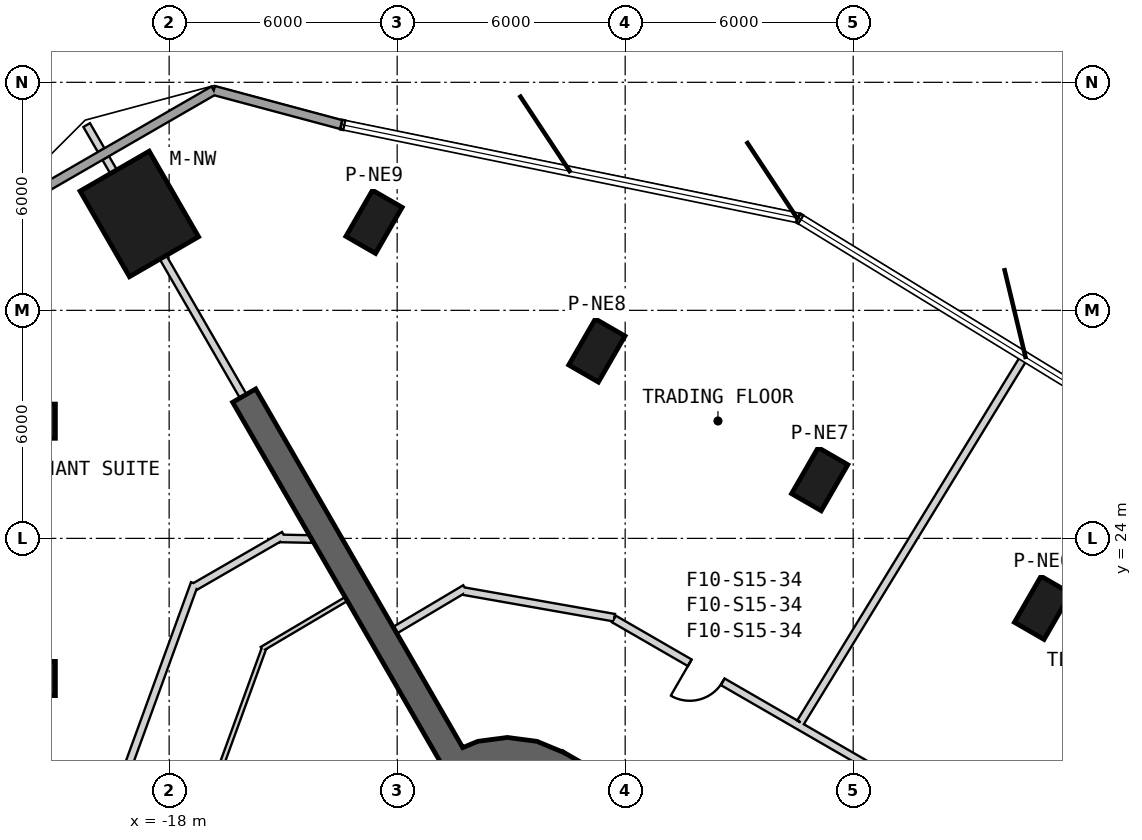
"""IFC4 building model, lengths in metres.
Left out: names, types, materials, properties, quantities, classifications, styles, units other than length and angle.
Written with IfcOpenShell. Run it as: python <this file> out.ifc"""

import sys

from ifc_helpers import new_model, si_unit, direction, frame, frame_2d, origin, origin_2d, place, context, subcontext, project, spatial, polyline, rectangle, outline, extrude, element, fill, save


model = new_model("IFC4")
c1 = context("Model", 3, precision=1e-05, world=origin(), true_north=direction((0.0, 1.0)))
c2 = subcontext(c1, "Body", "Model", "MODEL_VIEW")
j1 = project(units=[si_unit("LENGTHUNIT", "METRE"), si_unit("PLANEANGLEUNIT", "RADIAN")], contexts=[c1])
p1 = place(None, origin())
s1 = spatial("IfcSite", under=j1, at=p1, CompositionType="ELEMENT")
p2 = place(p1, origin())
s2 = spatial("IfcBuilding", under=s1, at=p2, CompositionType="ELEMENT")
p3 = place(p2, frame((0.0, 0.0, 241.2)))
s3 = spatial("IfcBuildingStorey", under=s2, at=p3, CompositionType="ELEMENT", Elevation=241.2)
p4 = place(p3, frame((-18.785, 32.536, 0.0), z_axis=(0.0, 0.0, 1.0), x_axis=(-0.5, 0.866025403784, 0.0)))
e1 = element("IfcColumn", 1, at=p4, inside=s3, PredefinedType="COLUMN", context=c2, shape_type="SweptSolid", body=[
    extrude(rectangle(XDim=2.6, YDim=2.1, at=origin_2d()), origin(), (0.0, 0.0, 1.0), 4.0),
])
for number, where, z_axis, x_axis in (
    (2, (-21.693, 27.084, 0.0), (0.0, 0.0, 1.0), (-1.0, 0.0, 0.0)),
    (3, (-21.693, 20.313, 0.0), (0.0, 0.0, 1.0), (-1.0, 0.0, 0.0)),
    (4, (4.983, 22.172, 0.0), (0.0, 0.0, 1.0), (0.5, 0.866, 0.0)),
    (5, (-0.881, 25.558, 0.0), (0.0, 0.0, 1.0), (0.5, 0.866, 0.0)),
    (6, (-6.745, 28.943, 0.0), (0.0, 0.0, 1.0), (0.5, 0.866, 0.0)),
    (7, (-12.609, 32.329, 0.0), (0.0, 0.0, 1.0), (0.5, 0.866, 0.0)),
):
    element("IfcColumn", number, at=place(p3, frame(where, z_axis=z_axis, x_axis=x_axis)), inside=s3, PredefinedType="COLUMN", context=c2, shape_type="SweptSolid", body=[
        extrude(rectangle(XDim=1.4, YDim=0.9, at=origin_2d()), origin(), (0.0, 0.0, 1.0), 4.0),
    ])
p5 = place(p3, frame((19.475, 2.208, 0.0), z_axis=(0.0, 0.0, 1.0), x_axis=(-0.866028369851, 0.499994862586, 0.0)))
e8 = element("IfcWall", 8, at=p5, inside=s3, PredefinedType="SHEAR", context=c2, shape_type="SweptSolid", body=[
    extrude(rectangle(XDim=31.523, YDim=0.9, at=frame_2d((15.762, 0.0))), origin(), (0.0, 0.0, 1.0), 4.0),
])
p6 = place(p5, frame((7.062, 0.0, 0.0)))
e9 = element("IfcOpeningElement", 9, at=p6, cuts=e8, PredefinedType="OPENING", context=c2, shape_type="SweptSolid", body=[
    extrude(rectangle(XDim=1.2, YDim=2.4, at=frame_2d((0.6, 1.2))), frame((0.0, 0.46, 0.0), z_axis=(0.0, -1.0, 0.0), x_axis=(1.0, 0.0, 0.0)), (0.0, 0.0, 1.0), 0.92),
])
p7 = place(p5, frame((3.612, 0.0, 0.0)))
e10 = element("IfcOpeningElement", 10, at=p7, cuts=e8, PredefinedType="OPENING", context=c2, shape_type="SweptSolid", body=[
    extrude(rectangle(XDim=1.2, YDim=2.4, at=frame_2d((0.6, 1.2))), frame((0.0, 0.46, 0.0), z_axis=(0.0, -1.0, 0.0), x_axis=(1.0, 0.0, 0.0)), (0.0, 0.0, 1.0), 0.92),
])
p8 = place(p5, frame((26.712, 0.0, 0.0)))
e11 = element("IfcOpeningElement", 11, at=p8, cuts=e8, PredefinedType="OPENING", context=c2, shape_type="SweptSolid", body=[
    extrude(rectangle(XDim=1.2, YDim=2.4, at=frame_2d((0.6, 1.2))), frame((0.0, 0.46, 0.0), z_axis=(0.0, -1.0, 0.0), x_axis=(1.0, 0.0, 0.0)), (0.0, 0.0, 1.0), 0.92),
])
p9 = place(p3, origin())
e12 = element("IfcWall", 12, at=p9, inside=s3, PredefinedType="SHEAR", context=c2, shape_type="SweptSolid", body=[
    extrude(outline(polyline([(-7.6, 18.36), (-8.323, 18.659), (-9.1, 18.762), (-9.876, 18.659), (-10.6, 18.36), (-11.221, 17.883), (-11.698, 17.262), (-11.998, 16.538), (-12.1, 15.762), (-11.2, 15.762), (-11.128, 16.305), (-10.919, 16.812), (-10.585, 17.247), (-10.15, 17.58), (-9.644, 17.79), (-9.1, 17.862), (-8.556, 17.79), (-8.05, 17.58), (-7.6, 18.36)])), origin(), (0.0, 0.0, 1.0), 4.0),
])
p10 = place(p3, frame((-10.575, 18.316, 0.0), z_axis=(0.0, 0.0, 1.0), x_axis=(-0.500002931134, 0.866023711487, 0.0)))
e13 = element("IfcWall", 13, at=p10, inside=s3, PredefinedType="SHEAR", context=c2, shape_type="SweptSolid", body=[
    extrude(rectangle(XDim=10.9, YDim=0.7, at=frame_2d((5.45, 0.0))), origin(), (0.0, 0.0, 1.0), 4.0),
])
p11 = place(p3, frame((-13.471, 34.888, 0.0), z_axis=(0.0, 0.0, 1.0), x_axis=(-0.965929859648, 0.258803991931, 0.0)))
e14 = element("IfcWall", 14, at=p11, inside=s3, PredefinedType="SOLIDWALL", context=c2, shape_type="SweptSolid", body=[
    extrude(rectangle(XDim=3.474, YDim=0.24, at=frame_2d((1.737, 0.0))), origin(), (0.0, 0.0, 1.0), 3.7),
])
p12 = place(p3, frame((-16.827, 35.787, 0.0), z_axis=(0.0, 0.0, 1.0), x_axis=(-0.866017876419, -0.500013037552, 0.0)))
e15 = element("IfcWall", 15, at=p12, inside=s3, PredefinedType="SOLIDWALL", context=c2, shape_type="SweptSolid", body=[
    extrude(rectangle(XDim=6.642, YDim=0.24, at=frame_2d((3.321, 0.0))), origin(), (0.0, 0.0, 1.0), 3.7),
])
p13 = place(p3, frame((-13.339, 22.405, 0.0), z_axis=(0.0, 0.0, 1.0), x_axis=(-0.86070028932, -0.509111983718, 0.0)))
e16 = element("IfcWall", 16, at=p13, inside=s3, PredefinedType="PARTITIONING", context=c2, shape_type="SweptSolid", body=[
    extrude(rectangle(XDim=2.579, YDim=0.12, at=frame_2d((1.29, 0.0))), origin(), (0.0, 0.0, 1.0), 3.7),
])
p14 = place(p3, frame((-15.506, 21.103, 0.0), z_axis=(0.0, 0.0, 1.0), x_axis=(-0.342017079535, -0.939693735909, 0.0)))
e17 = element("IfcWall", 17, at=p14, inside=s3, PredefinedType="PARTITIONING", context=c2, shape_type="SweptSolid", body=[
    extrude(rectangle(XDim=4.721, YDim=0.12, at=frame_2d((2.361, 0.0))), origin(), (0.0, 0.0, 1.0), 2.88),
])
p15 = place(p3, frame((-17.331, 22.814, 0.0), z_axis=(0.0, 0.0, 1.0), x_axis=(-0.342006584993, -0.939697555505, 0.0)))
e18 = element("IfcWall", 18, at=p15, inside=s3, PredefinedType="PARTITIONING", context=c2, shape_type="SweptSolid", body=[
    extrude(rectangle(XDim=5.951, YDim=0.2, at=frame_2d((2.975, 0.0))), origin(), (0.0, 0.0, 1.0), 2.88),
])
p16 = place(p3, frame((-14.98, 24.083, 0.0), z_axis=(0.0, 0.0, 1.0), x_axis=(-0.866008795918, -0.500028764566, 0.0)))
e19 = element("IfcWall", 19, at=p16, inside=s3, PredefinedType="PARTITIONING", context=c2, shape_type="SweptSolid", body=[
    extrude(rectangle(XDim=2.714, YDim=0.2, at=frame_2d((1.357, 0.0))), origin(), (0.0, 0.0, 1.0), 3.7),
])
p17 = place(p3, frame((-14.25, 23.982, 0.0), z_axis=(0.0, 0.0, 1.0), x_axis=(-0.999799129767, 0.02004245786, 0.0)))
e20 = element("IfcWall", 20, at=p17, inside=s3, PredefinedType="PARTITIONING", context=c2, shape_type="SweptSolid", body=[
    extrude(rectangle(XDim=0.841, YDim=0.2, at=frame_2d((0.42, 0.0))), origin(), (0.0, 0.0, 1.0), 3.7),
])
p18 = place(p3, frame((-10.21, 22.681, 0.0), z_axis=(0.0, 0.0, 1.0), x_axis=(-0.859700405816, -0.510798602425, 0.0)))
e21 = element("IfcWall", 21, at=p18, inside=s3, PredefinedType="PARTITIONING", context=c2, shape_type="SweptSolid", body=[
    extrude(rectangle(XDim=2.149, YDim=0.2, at=frame_2d((1.074, 0.0))), origin(), (0.0, 0.0, 1.0), 3.7),
])
p19 = place(p3, frame((-6.285, 21.913, 0.0), z_axis=(0.0, 0.0, 1.0), x_axis=(-0.984806073034, 0.173657705026, 0.0)))
e22 = element("IfcWall", 22, at=p19, inside=s3, PredefinedType="PARTITIONING", context=c2, shape_type="SweptSolid", body=[
    extrude(rectangle(XDim=4.038, YDim=0.2, at=frame_2d((2.019, 0.0))), origin(), (0.0, 0.0, 1.0), 2.88),
])
p20 = place(p3, frame((9.675, 12.658, 0.0), z_axis=(0.0, 0.0, 1.0), x_axis=(-0.866025327327, 0.500000132428, 0.0)))
e23 = element("IfcWall", 23, at=p20, inside=s3, PredefinedType="PARTITIONING", context=c2, shape_type="SweptSolid", body=[
    extrude(rectangle(XDim=18.443, YDim=0.2, at=frame_2d((9.222, 0.0))), origin(), (0.0, 0.0, 1.0), 2.98),
])
p21 = place(p20, frame((15.138, 0.0, 0.0)))
e24 = element("IfcOpeningElement", 24, at=p21, cuts=e23, PredefinedType="OPENING", context=c2, shape_type="SweptSolid", body=[
    extrude(rectangle(XDim=1.0, YDim=2.1, at=frame_2d((0.5, 1.05))), frame((0.0, 0.11, 0.0), z_axis=(0.0, -1.0, 0.0), x_axis=(1.0, 0.0, 0.0)), (0.0, 0.0, 1.0), 0.22),
])
p22 = place(p3, frame((-20.17, 34.875, 0.0), z_axis=(0.0, 0.0, 1.0), x_axis=(0.499999897272, -0.866025463095, 0.0)))
e25 = element("IfcWall", 25, at=p22, inside=s3, PredefinedType="PARTITIONING", context=c2, shape_type="SweptSolid", body=[
    extrude(rectangle(XDim=0.762, YDim=0.2, at=frame_2d((0.381, 0.0))), origin(), (0.0, 0.0, 1.0), 3.7),
])
p23 = place(p3, frame((-19.669, 34.007, 0.0), z_axis=(0.0, 0.0, 1.0), x_axis=(0.499739399214, -0.866175809448, 0.0)))
e26 = element("IfcWall", 26, at=p23, inside=s3, PredefinedType="PARTITIONING", context=c2, shape_type="SweptSolid", body=[
    extrude(rectangle(XDim=0.416, YDim=0.2, at=frame_2d((0.208, 0.0))), origin(), (0.0, 0.0, 1.0), 3.7),
])
p24 = place(p3, frame((-18.161, 31.396, 0.0), z_axis=(0.0, 0.0, 1.0), x_axis=(0.500034652011, -0.866005396512, 0.0)))
e27 = element("IfcWall", 27, at=p24, inside=s3, PredefinedType="PARTITIONING", context=c2, shape_type="SweptSolid", body=[
    extrude(rectangle(XDim=4.219, YDim=0.2, at=frame_2d((2.11, 0.0))), origin(), (0.0, 0.0, 1.0), 3.27),
])
p25 = place(p3, frame((-1.385, 19.16, 0.0), z_axis=(0.0, 0.0, 1.0), x_axis=(0.522271376538, 0.852779343822, 0.0)))
e28 = element("IfcWall", 28, at=p25, inside=s3, PredefinedType="PARTITIONING", context=c2, shape_type="SweptSolid", body=[
    extrude(rectangle(XDim=11.286, YDim=0.2, at=frame_2d((5.643, 0.0))), origin(), (0.0, 0.0, 1.0), 2.98),
])
p26 = place(p21, origin())
e29 = element("IfcDoor", 29, at=p26, inside=s3, OperationType="SINGLE_SWING_LEFT", PredefinedType="USERDEFINED", context=c2, shape_type="SweptSolid", body=[
    extrude(rectangle(XDim=1.0, YDim=2.1, at=frame_2d((0.5, 1.05))), frame((0.0, 0.025, 0.0), z_axis=(0.0, -1.0, 0.0), x_axis=(1.0, 0.0, 0.0)), (0.0, 0.0, 1.0), 0.05),
])
fill(e24, e29)
save(model, sys.argv[1])
